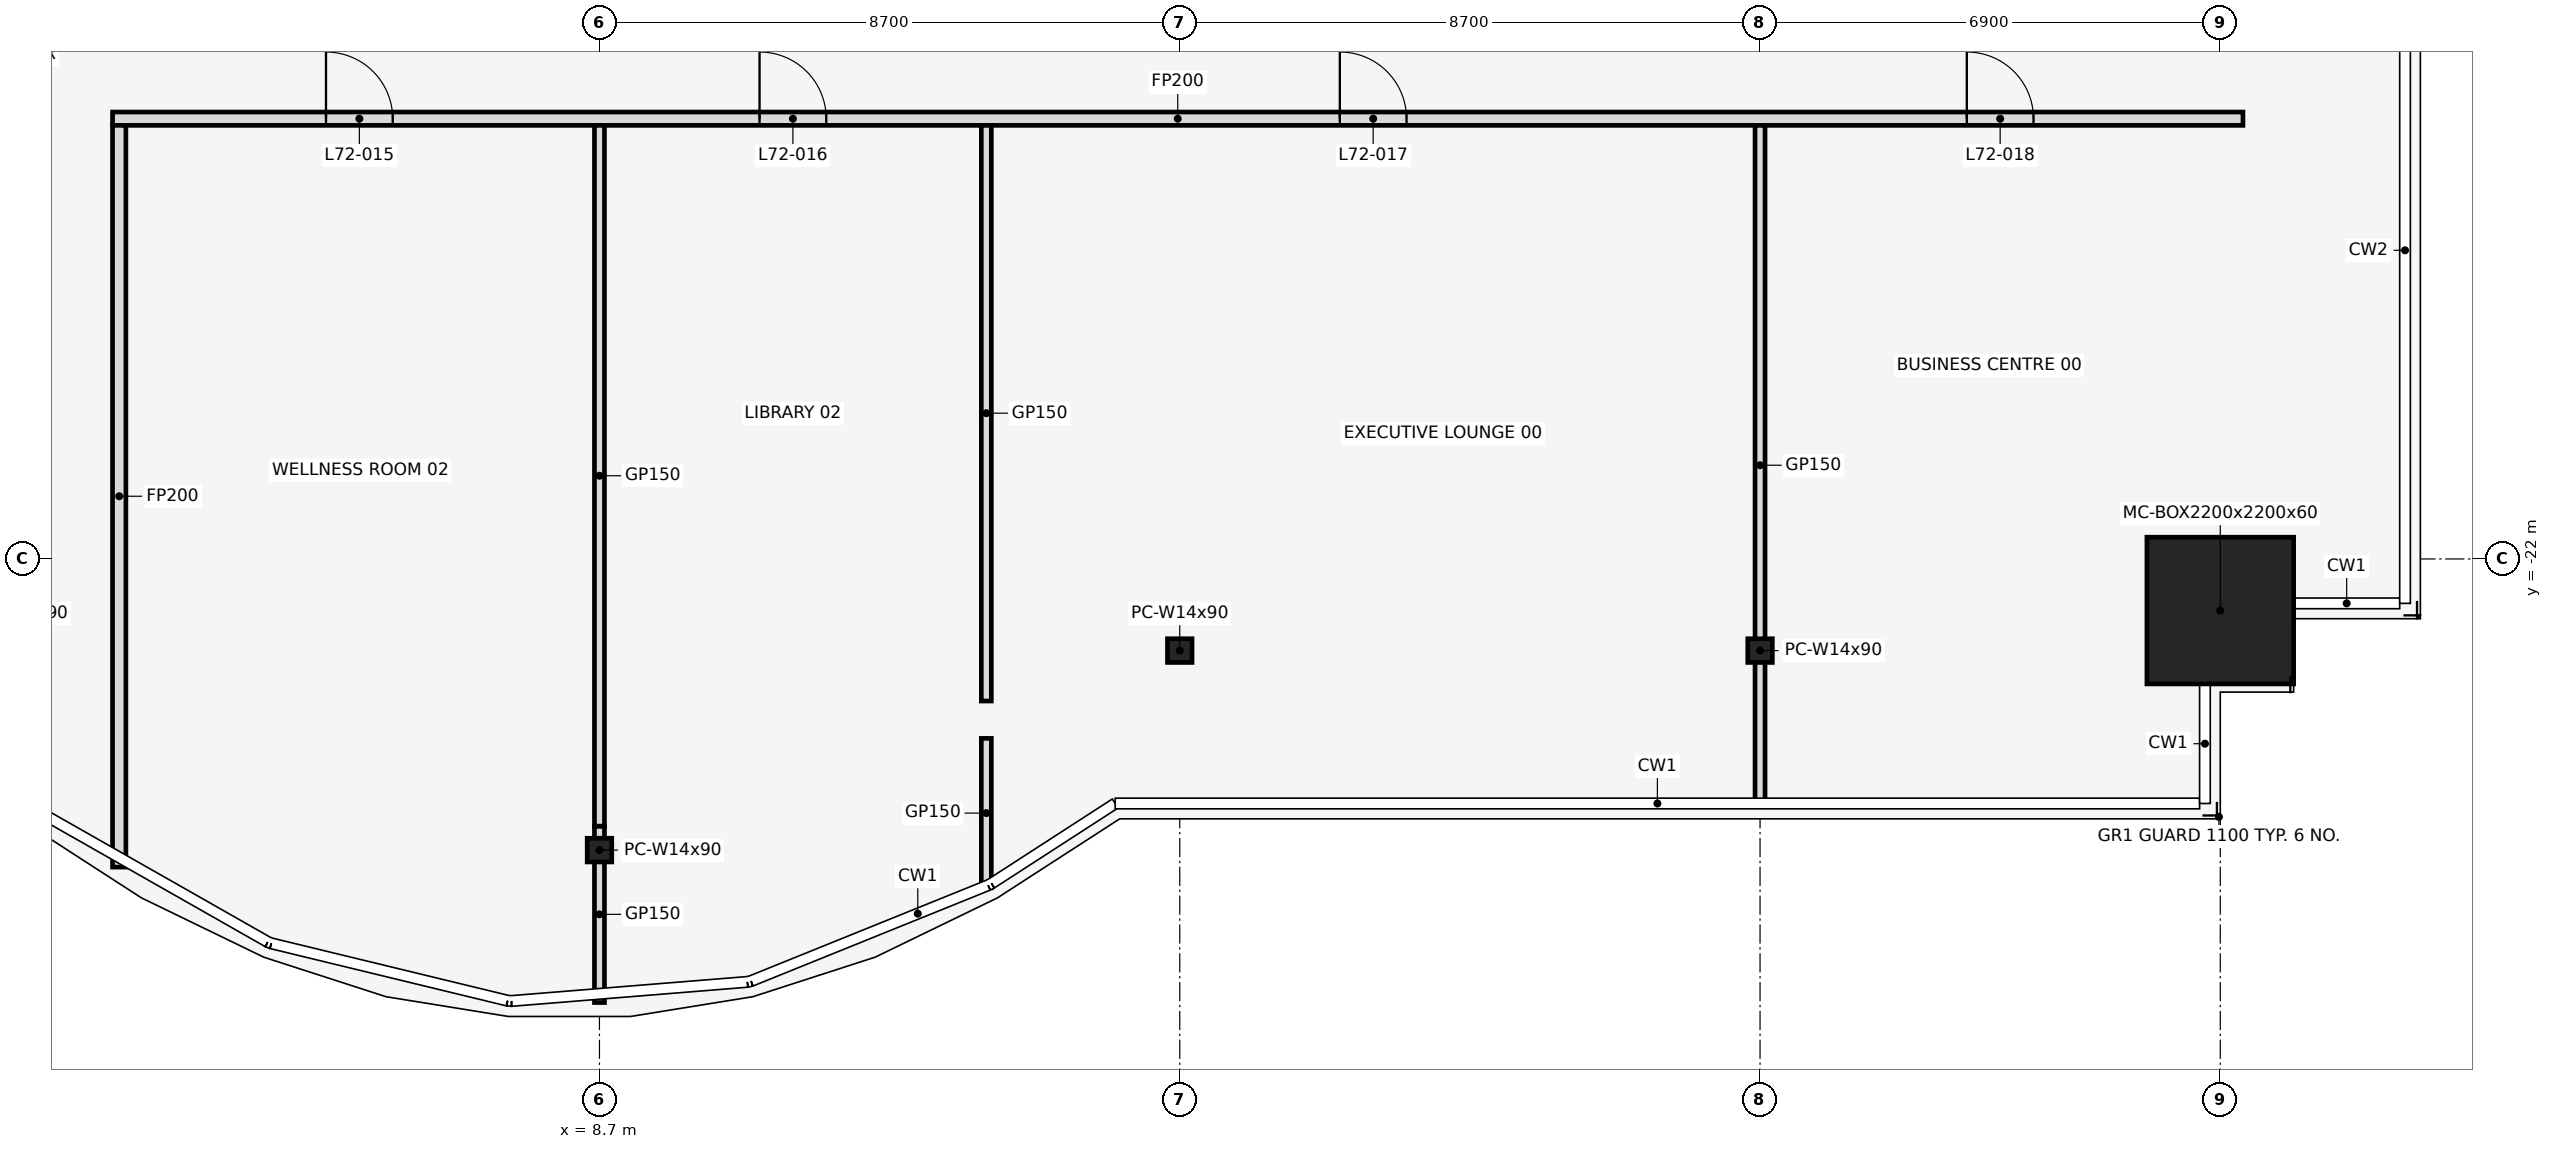
"""IFC4 building model, lengths in metres.
Left out: names, types, materials, properties, quantities, classifications, styles, units other than length and angle.
Written with IfcOpenShell. Run it as: python <this file> out.ifc"""

import sys

from ifc_helpers import new_model, si_unit, direction, frame, frame_2d, origin, origin_2d, place, context, subcontext, project, spatial, rectangle, hollow_rectangle, i_section, extrude, element, fill, save


model = new_model("IFC4")
c1 = context("Model", 3, precision=1e-05, world=origin(), true_north=direction((0.0, 1.0)))
c2 = subcontext(c1, "Body", "Model", "MODEL_VIEW")
j1 = project(units=[si_unit("LENGTHUNIT", "METRE"), si_unit("PLANEANGLEUNIT", "RADIAN")], contexts=[c1])
p1 = place(None, origin())
s1 = spatial("IfcSite", under=j1, at=p1, CompositionType="ELEMENT")
p2 = place(p1, origin())
s2 = spatial("IfcBuilding", under=s1, at=p2, CompositionType="ELEMENT")
p3 = place(p2, frame((0.0, 0.0, 320.0)))
s3 = spatial("IfcBuildingStorey", under=s2, at=p3, CompositionType="ELEMENT", Elevation=320.0)
for number, where, z_axis, x_axis in (
    (1, (8.7, -26.365, 0.0), (0.0, 0.0, 1.0), (1.0, 0.0, 0.0)),
    (2, (17.4, -23.374, 0.0), (0.0, 0.0, 1.0), (1.0, 0.0, 0.0)),
    (3, (26.1, -23.374, 0.0), (0.0, 0.0, 1.0), (1.0, 0.0, 0.0)),
):
    element("IfcColumn", number, at=place(p3, frame(where, z_axis=z_axis, x_axis=x_axis)), inside=s3, PredefinedType="COLUMN", context=c2, shape_type="SweptSolid", body=[
        extrude(i_section(OverallWidth=0.368, OverallDepth=0.356, WebThickness=0.011, FlangeThickness=0.018, at=origin_2d()), origin(), (0.0, 0.0, 1.0), 4.5),
    ])
p4 = place(p3, frame((33.0, -22.774, 0.0), z_axis=(0.0, 0.0, 1.0), x_axis=(1.0, 0.0, 0.0)))
e4 = element("IfcColumn", 4, at=p4, inside=s3, PredefinedType="COLUMN", context=c2, shape_type="SweptSolid", body=[
    extrude(hollow_rectangle(XDim=2.2, YDim=2.2, WallThickness=0.06, at=origin_2d()), origin(), (0.0, 0.0, 1.0), 4.5),
])
p5 = place(p3, frame((1.4, -15.4, 0.0), z_axis=(0.0, 0.0, 1.0), x_axis=(1.0, 0.0, 0.0)))
e5 = element("IfcWall", 5, at=p5, inside=s3, PredefinedType="PARTITIONING", context=c2, shape_type="SweptSolid", body=[
    extrude(rectangle(XDim=31.94, YDim=0.2, at=frame_2d((15.97, 0.0))), origin(), (0.0, 0.0, 1.0), 3.418),
])
p6 = place(p5, frame((3.2, 0.0, 0.0)))
e6 = element("IfcOpeningElement", 6, at=p6, cuts=e5, PredefinedType="OPENING", context=c2, shape_type="SweptSolid", body=[
    extrude(rectangle(XDim=1.0, YDim=2.1, at=frame_2d((0.5, 1.05))), frame((0.0, 0.112, 0.0), z_axis=(0.0, -1.0, 0.0), x_axis=(1.0, 0.0, 0.0)), (0.0, 0.0, 1.0), 0.224),
])
p7 = place(p5, frame((9.7, 0.0, 0.0)))
e7 = element("IfcOpeningElement", 7, at=p7, cuts=e5, PredefinedType="OPENING", context=c2, shape_type="SweptSolid", body=[
    extrude(rectangle(XDim=1.0, YDim=2.1, at=frame_2d((0.5, 1.05))), frame((0.0, 0.112, 0.0), z_axis=(0.0, -1.0, 0.0), x_axis=(1.0, 0.0, 0.0)), (0.0, 0.0, 1.0), 0.224),
])
p8 = place(p5, frame((18.4, 0.0, 0.0)))
e8 = element("IfcOpeningElement", 8, at=p8, cuts=e5, PredefinedType="OPENING", context=c2, shape_type="SweptSolid", body=[
    extrude(rectangle(XDim=1.0, YDim=2.1, at=frame_2d((0.5, 1.05))), frame((0.0, 0.112, 0.0), z_axis=(0.0, -1.0, 0.0), x_axis=(1.0, 0.0, 0.0)), (0.0, 0.0, 1.0), 0.224),
])
p9 = place(p5, frame((27.8, 0.0, 0.0)))
e9 = element("IfcOpeningElement", 9, at=p9, cuts=e5, PredefinedType="OPENING", context=c2, shape_type="SweptSolid", body=[
    extrude(rectangle(XDim=1.0, YDim=2.1, at=frame_2d((0.5, 1.05))), frame((0.0, 0.112, 0.0), z_axis=(0.0, -1.0, 0.0), x_axis=(1.0, 0.0, 0.0)), (0.0, 0.0, 1.0), 0.224),
])
p10 = place(p3, frame((1.5, -26.62, 0.0), z_axis=(0.0, 0.0, 1.0), x_axis=(0.0, 1.0, 0.0)))
e10 = element("IfcWall", 10, at=p10, inside=s3, PredefinedType="PARTITIONING", context=c2, shape_type="SweptSolid", body=[
    extrude(rectangle(XDim=11.12, YDim=0.2, at=frame_2d((5.56, 0.0))), origin(), (0.0, 0.0, 1.0), 3.418),
])
p11 = place(p3, frame((8.7, -28.65, 0.0), z_axis=(0.0, 0.0, 1.0), x_axis=(0.0, 1.0, 0.0)))
e11 = element("IfcWall", 11, at=p11, inside=s3, PredefinedType="PARTITIONING", context=c2, shape_type="SweptSolid", body=[
    extrude(rectangle(XDim=2.644, YDim=0.15, at=frame_2d((1.322, 0.0))), origin(), (0.0, 0.0, 1.0), 3.418),
])
p12 = place(p3, frame((8.7, -26.006, 0.0), z_axis=(0.0, 0.0, 1.0), x_axis=(0.0, 1.0, 0.0)))
e12 = element("IfcWall", 12, at=p12, inside=s3, PredefinedType="PARTITIONING", context=c2, shape_type="SweptSolid", body=[
    extrude(rectangle(XDim=10.506, YDim=0.15, at=frame_2d((5.253, 0.0))), origin(), (0.0, 0.0, 1.0), 3.418),
])
p13 = place(p3, frame((14.5, -26.93, 0.0), z_axis=(0.0, 0.0, 1.0), x_axis=(0.0, 1.0, 0.0)))
e13 = element("IfcWall", 13, at=p13, inside=s3, PredefinedType="PARTITIONING", context=c2, shape_type="SweptSolid", body=[
    extrude(rectangle(XDim=2.24, YDim=0.15, at=frame_2d((1.12, 0.0))), origin(), (0.0, 0.0, 1.0), 3.418),
])
p14 = place(p3, frame((14.5, -24.13, 0.0), z_axis=(0.0, 0.0, 1.0), x_axis=(0.0, 1.0, 0.0)))
e14 = element("IfcWall", 14, at=p14, inside=s3, PredefinedType="PARTITIONING", context=c2, shape_type="SweptSolid", body=[
    extrude(rectangle(XDim=8.63, YDim=0.15, at=frame_2d((4.315, 0.0))), origin(), (0.0, 0.0, 1.0), 3.418),
])
p15 = place(p3, frame((26.1, -25.69, 0.0), z_axis=(0.0, 0.0, 1.0), x_axis=(0.0, 1.0, 0.0)))
e15 = element("IfcWall", 15, at=p15, inside=s3, PredefinedType="PARTITIONING", context=c2, shape_type="SweptSolid", body=[
    extrude(rectangle(XDim=10.19, YDim=0.15, at=frame_2d((5.095, 0.0))), origin(), (0.0, 0.0, 1.0), 3.418),
])
p16 = place(p6, frame((1.0, 0.0, 0.0), z_axis=(0.0, 0.0, 1.0), x_axis=(-1.0, 0.0, 0.0)))
e16 = element("IfcDoor", 16, at=p16, inside=s3, OperationType="SINGLE_SWING_RIGHT", PredefinedType="DOOR", context=c2, shape_type="SweptSolid", body=[
    extrude(rectangle(XDim=1.0, YDim=2.1, at=frame_2d((0.5, 1.05))), frame((0.0, 0.025, 0.0), z_axis=(0.0, -1.0, 0.0), x_axis=(1.0, 0.0, 0.0)), (0.0, 0.0, 1.0), 0.05),
])
fill(e6, e16)
p17 = place(p7, frame((1.0, 0.0, 0.0), z_axis=(0.0, 0.0, 1.0), x_axis=(-1.0, 0.0, 0.0)))
e17 = element("IfcDoor", 17, at=p17, inside=s3, OperationType="SINGLE_SWING_LEFT", PredefinedType="DOOR", context=c2, shape_type="SweptSolid", body=[
    extrude(rectangle(XDim=1.0, YDim=2.1, at=frame_2d((0.5, 1.05))), frame((0.0, 0.025, 0.0), z_axis=(0.0, -1.0, 0.0), x_axis=(1.0, 0.0, 0.0)), (0.0, 0.0, 1.0), 0.05),
])
fill(e7, e17)
p18 = place(p8, frame((1.0, 0.0, 0.0), z_axis=(0.0, 0.0, 1.0), x_axis=(-1.0, 0.0, 0.0)))
e18 = element("IfcDoor", 18, at=p18, inside=s3, OperationType="SINGLE_SWING_RIGHT", PredefinedType="DOOR", context=c2, shape_type="SweptSolid", body=[
    extrude(rectangle(XDim=1.0, YDim=2.1, at=frame_2d((0.5, 1.05))), frame((0.0, 0.025, 0.0), z_axis=(0.0, -1.0, 0.0), x_axis=(1.0, 0.0, 0.0)), (0.0, 0.0, 1.0), 0.05),
])
fill(e8, e18)
p19 = place(p9, frame((1.0, 0.0, 0.0), z_axis=(0.0, 0.0, 1.0), x_axis=(-1.0, 0.0, 0.0)))
e19 = element("IfcDoor", 19, at=p19, inside=s3, OperationType="SINGLE_SWING_RIGHT", PredefinedType="DOOR", context=c2, shape_type="SweptSolid", body=[
    extrude(rectangle(XDim=1.0, YDim=2.1, at=frame_2d((0.5, 1.05))), frame((0.0, 0.025, 0.0), z_axis=(0.0, -1.0, 0.0), x_axis=(1.0, 0.0, 0.0)), (0.0, 0.0, 1.0), 0.05),
])
fill(e9, e19)
save(model, sys.argv[1])
